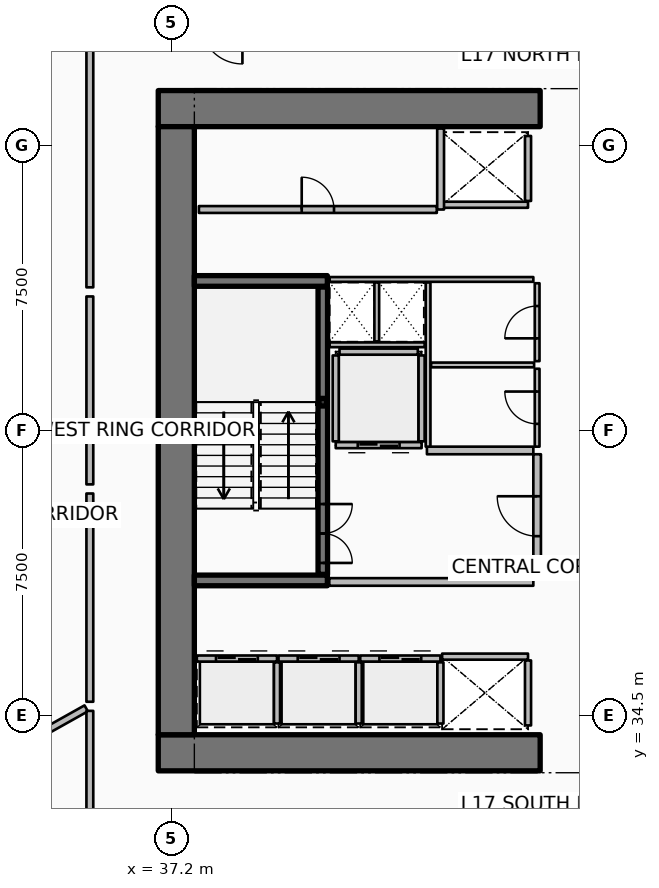
"""IFC4 building model, lengths in metres.
Left out: names, types, materials, properties, quantities, classifications, styles, units other than length and angle.
Written with IfcOpenShell. Run it as: python <this file> out.ifc"""

import sys

from ifc_helpers import new_model, si_unit, direction, frame, frame_2d, origin, origin_2d, place, context, subcontext, project, spatial, rectangle, hollow_rectangle, extrude, element, fill, save


model = new_model("IFC4")
c1 = context("Model", 3, precision=1e-05, world=origin(), true_north=direction((0.0, 1.0)))
c2 = subcontext(c1, "Body", "Model", "MODEL_VIEW")
j1 = project(units=[si_unit("LENGTHUNIT", "METRE"), si_unit("PLANEANGLEUNIT", "RADIAN")], contexts=[c1])
p1 = place(None, origin())
s1 = spatial("IfcSite", under=j1, at=p1, CompositionType="ELEMENT")
p2 = place(p1, origin())
s2 = spatial("IfcBuilding", under=s1, at=p2, CompositionType="ELEMENT")
p3 = place(p2, frame((0.0, 0.0, 71.4)))
s3 = spatial("IfcBuildingStorey", under=s2, at=p3, CompositionType="ELEMENT", Elevation=71.4)
for number, where, z_axis, x_axis in (
    (1, (36.85, 33.525, 0.0), (0.0, 0.0, 1.0), (1.0, 0.0, 0.0)),
    (2, (36.85, 50.475, 0.0), (0.0, 0.0, 1.0), (1.0, 0.0, 0.0)),
):
    element("IfcWall", number, at=place(p3, frame(where, z_axis=z_axis, x_axis=x_axis)), inside=s3, PredefinedType="SHEAR", context=c2, shape_type="SweptSolid", body=[
        extrude(rectangle(XDim=10.05, YDim=0.95, at=frame_2d((5.025, 0.0))), origin(), (0.0, 0.0, 1.0), 3.75),
    ])
p4 = place(p3, frame((37.325, 34.0, 0.0), z_axis=(0.0, 0.0, 1.0), x_axis=(0.0, 1.0, 0.0)))
e3 = element("IfcWall", 3, at=p4, inside=s3, PredefinedType="SHEAR", context=c2, shape_type="SweptSolid", body=[
    extrude(rectangle(XDim=16.0, YDim=0.95, at=frame_2d((8.0, 0.0))), origin(), (0.0, 0.0, 1.0), 3.75),
])
for number, where, z_axis, x_axis in (
    (4, (37.8, 38.06, 0.0), (0.0, 0.0, 1.0), (1.0, 0.0, 0.0)),
    (5, (37.8, 45.94, 0.0), (0.0, 0.0, 1.0), (1.0, 0.0, 0.0)),
):
    element("IfcWall", number, at=place(p3, frame(where, z_axis=z_axis, x_axis=x_axis)), inside=s3, PredefinedType="SHEAR", context=c2, shape_type="SweptSolid", body=[
        extrude(rectangle(XDim=3.5, YDim=0.28, at=frame_2d((1.75, 0.0))), origin(), (0.0, 0.0, 1.0), 3.75),
    ])
p5 = place(p3, frame((41.18, 42.75, 0.0), z_axis=(0.0, 0.0, 1.0), x_axis=(1.0, 0.0, 0.0)))
e6 = element("IfcColumn", 6, at=p5, inside=s3, PredefinedType="COLUMN", context=c2, shape_type="SweptSolid", body=[
    extrude(hollow_rectangle(XDim=0.2, YDim=0.2, WallThickness=0.01, InnerFilletRadius=0.01, OuterFilletRadius=0.02, at=origin_2d()), origin(), (0.0, 0.0, 1.0), 1.67),
])
p6 = place(p3, frame((41.18, 38.22, 0.0), z_axis=(0.0, 0.0, 1.0), x_axis=(0.0, 1.0, 0.0)))
e7 = element("IfcWall", 7, at=p6, inside=s3, PredefinedType="SOLIDWALL", context=c2, shape_type="SweptSolid", body=[
    extrude(rectangle(XDim=7.56, YDim=0.25, at=frame_2d((3.78, 0.0))), origin(), (0.0, 0.0, 1.0), 3.35),
])
p7 = place(p6, frame((0.3, 0.0, 0.0)))
e8 = element("IfcOpeningElement", 8, at=p7, cuts=e7, PredefinedType="OPENING", context=c2, shape_type="SweptSolid", body=[
    extrude(rectangle(XDim=1.55, YDim=2.15, at=frame_2d((0.775, 1.075))), frame((0.0, 0.135, 0.0), z_axis=(0.0, -1.0, 0.0), x_axis=(1.0, 0.0, 0.0)), (0.0, 0.0, 1.0), 0.27),
])
p8 = place(p3, frame((37.865, 36.005, 0.0), z_axis=(0.0, 0.0, 1.0), x_axis=(1.0, 0.0, 0.0)))
e9 = element("IfcWall", 9, at=p8, inside=s3, PredefinedType="PARTITIONING", context=c2, shape_type="SweptSolid", body=[
    extrude(rectangle(XDim=2.11, YDim=0.16, at=frame_2d((1.055, 0.0))), origin(), (0.0, 0.0, 1.0), 3.35),
])
p9 = place(p8, frame((0.505, 0.0, 0.0)))
e10 = element("IfcOpeningElement", 10, at=p9, cuts=e9, PredefinedType="OPENING", context=c2, shape_type="SweptSolid", body=[
    extrude(rectangle(XDim=1.1, YDim=2.1, at=frame_2d((0.55, 1.05))), frame((0.0, 0.09, 0.0), z_axis=(0.0, -1.0, 0.0), x_axis=(1.0, 0.0, 0.0)), (0.0, 0.0, 1.0), 0.18),
])
p10 = place(p3, frame((39.975, 34.295, 0.0), z_axis=(0.0, 0.0, 1.0), x_axis=(0.0, 1.0, 0.0)))
e11 = element("IfcWall", 11, at=p10, inside=s3, PredefinedType="PARTITIONING", context=c2, shape_type="SweptSolid", body=[
    extrude(rectangle(XDim=1.61, YDim=0.16, at=frame_2d((0.805, 0.0))), origin(), (0.0, 0.0, 1.0), 3.35),
])
p11 = place(p3, frame((40.015, 36.005, 0.0), z_axis=(0.0, 0.0, 1.0), x_axis=(1.0, 0.0, 0.0)))
e12 = element("IfcWall", 12, at=p11, inside=s3, PredefinedType="PARTITIONING", context=c2, shape_type="SweptSolid", body=[
    extrude(rectangle(XDim=2.11, YDim=0.16, at=frame_2d((1.055, 0.0))), origin(), (0.0, 0.0, 1.0), 3.35),
])
p12 = place(p11, frame((0.505, 0.0, 0.0)))
e13 = element("IfcOpeningElement", 13, at=p12, cuts=e12, PredefinedType="OPENING", context=c2, shape_type="SweptSolid", body=[
    extrude(rectangle(XDim=1.1, YDim=2.1, at=frame_2d((0.55, 1.05))), frame((0.0, 0.09, 0.0), z_axis=(0.0, -1.0, 0.0), x_axis=(1.0, 0.0, 0.0)), (0.0, 0.0, 1.0), 0.18),
])
p13 = place(p3, frame((42.125, 34.295, 0.0), z_axis=(0.0, 0.0, 1.0), x_axis=(0.0, 1.0, 0.0)))
e14 = element("IfcWall", 14, at=p13, inside=s3, PredefinedType="PARTITIONING", context=c2, shape_type="SweptSolid", body=[
    extrude(rectangle(XDim=1.61, YDim=0.16, at=frame_2d((0.805, 0.0))), origin(), (0.0, 0.0, 1.0), 3.35),
])
p14 = place(p3, frame((42.165, 36.005, 0.0), z_axis=(0.0, 0.0, 1.0), x_axis=(1.0, 0.0, 0.0)))
e15 = element("IfcWall", 15, at=p14, inside=s3, PredefinedType="PARTITIONING", context=c2, shape_type="SweptSolid", body=[
    extrude(rectangle(XDim=2.11, YDim=0.16, at=frame_2d((1.055, 0.0))), origin(), (0.0, 0.0, 1.0), 3.35),
])
p15 = place(p14, frame((0.505, 0.0, 0.0)))
e16 = element("IfcOpeningElement", 16, at=p15, cuts=e15, PredefinedType="OPENING", context=c2, shape_type="SweptSolid", body=[
    extrude(rectangle(XDim=1.1, YDim=2.1, at=frame_2d((0.55, 1.05))), frame((0.0, 0.09, 0.0), z_axis=(0.0, -1.0, 0.0), x_axis=(1.0, 0.0, 0.0)), (0.0, 0.0, 1.0), 0.18),
])
p16 = place(p3, frame((44.275, 34.295, 0.0), z_axis=(0.0, 0.0, 1.0), x_axis=(0.0, 1.0, 0.0)))
e17 = element("IfcWall", 17, at=p16, inside=s3, PredefinedType="PARTITIONING", context=c2, shape_type="SweptSolid", body=[
    extrude(rectangle(XDim=1.61, YDim=0.16, at=frame_2d((0.805, 0.0))), origin(), (0.0, 0.0, 1.0), 3.35),
])
p17 = place(p3, frame((46.58, 47.945, 0.0), z_axis=(0.0, 0.0, 1.0), x_axis=(-1.0, 0.0, 0.0)))
e18 = element("IfcWall", 18, at=p17, inside=s3, PredefinedType="PARTITIONING", context=c2, shape_type="SweptSolid", body=[
    extrude(rectangle(XDim=2.26, YDim=0.16, at=frame_2d((1.13, 0.0))), origin(), (0.0, 0.0, 1.0), 3.35),
])
p18 = place(p3, frame((46.58, 48.045, 0.0), z_axis=(0.0, 0.0, 1.0), x_axis=(0.0, 1.0, 0.0)))
e19 = element("IfcWall", 19, at=p18, inside=s3, PredefinedType="PARTITIONING", context=c2, shape_type="SweptSolid", body=[
    extrude(rectangle(XDim=1.71, YDim=0.16, at=frame_2d((0.855, 0.0))), origin(), (0.0, 0.0, 1.0), 3.35),
])
p19 = place(p3, frame((44.32, 36.055, 0.0), z_axis=(0.0, 0.0, 1.0), x_axis=(1.0, 0.0, 0.0)))
e20 = element("IfcWall", 20, at=p19, inside=s3, PredefinedType="PARTITIONING", context=c2, shape_type="SweptSolid", body=[
    extrude(rectangle(XDim=2.26, YDim=0.16, at=frame_2d((1.13, 0.0))), origin(), (0.0, 0.0, 1.0), 3.35),
])
p20 = place(p3, frame((46.58, 34.245, 0.0), z_axis=(0.0, 0.0, 1.0), x_axis=(0.0, 1.0, 0.0)))
e21 = element("IfcWall", 21, at=p20, inside=s3, PredefinedType="PARTITIONING", context=c2, shape_type="SweptSolid", body=[
    extrude(rectangle(XDim=1.71, YDim=0.16, at=frame_2d((0.855, 0.0))), origin(), (0.0, 0.0, 1.0), 3.35),
])
p21 = place(p3, frame((43.78, 41.62, 0.0), z_axis=(0.0, 0.0, 1.0), x_axis=(-1.0, 0.0, 0.0)))
e22 = element("IfcWall", 22, at=p21, inside=s3, PredefinedType="PARTITIONING", context=c2, shape_type="SweptSolid", body=[
    extrude(rectangle(XDim=2.26, YDim=0.16, at=frame_2d((1.13, 0.0))), origin(), (0.0, 0.0, 1.0), 3.35),
])
p22 = place(p21, frame((0.58, 0.0, 0.0)))
e23 = element("IfcOpeningElement", 23, at=p22, cuts=e22, PredefinedType="OPENING", context=c2, shape_type="SweptSolid", body=[
    extrude(rectangle(XDim=1.1, YDim=2.1, at=frame_2d((0.55, 1.05))), frame((0.0, 0.09, 0.0), z_axis=(0.0, -1.0, 0.0), x_axis=(1.0, 0.0, 0.0)), (0.0, 0.0, 1.0), 0.18),
])
for number, where, z_axis, x_axis in (
    (24, (43.78, 41.72, 0.0), (0.0, 0.0, 1.0), (0.0, 1.0, 0.0)),
    (25, (41.52, 41.72, 0.0), (0.0, 0.0, 1.0), (0.0, 1.0, 0.0)),
):
    element("IfcWall", number, at=place(p3, frame(where, z_axis=z_axis, x_axis=x_axis)), inside=s3, PredefinedType="PARTITIONING", context=c2, shape_type="SweptSolid", body=[
        extrude(rectangle(XDim=2.26, YDim=0.16, at=frame_2d((1.13, 0.0))), origin(), (0.0, 0.0, 1.0), 3.35),
    ])
p23 = place(p3, frame((41.62, 44.08, 0.0), z_axis=(0.0, 0.0, 1.0), x_axis=(1.0, 0.0, 0.0)))
e26 = element("IfcWall", 26, at=p23, inside=s3, PredefinedType="PARTITIONING", context=c2, shape_type="SweptSolid", body=[
    extrude(rectangle(XDim=2.06, YDim=0.16, at=frame_2d((1.03, 0.0))), origin(), (0.0, 0.0, 1.0), 3.35),
])
p24 = place(p3, frame((37.92, 47.82, 0.0), z_axis=(0.0, 0.0, 1.0), x_axis=(1.0, 0.0, 0.0)))
e27 = element("IfcWall", 27, at=p24, inside=s3, PredefinedType="PARTITIONING", context=c2, shape_type="SweptSolid", body=[
    extrude(rectangle(XDim=6.26, YDim=0.18, at=frame_2d((3.13, 0.0))), origin(), (0.0, 0.0, 1.0), 3.35),
])
p25 = place(p24, frame((2.705, 0.0, 0.0)))
e28 = element("IfcOpeningElement", 28, at=p25, cuts=e27, PredefinedType="OPENING", context=c2, shape_type="SweptSolid", body=[
    extrude(rectangle(XDim=0.85, YDim=2.06, at=frame_2d((0.425, 1.03))), frame((0.0, 0.1, 0.0), z_axis=(0.0, -1.0, 0.0), x_axis=(1.0, 0.0, 0.0)), (0.0, 0.0, 1.0), 0.2),
])
p26 = place(p3, frame((44.28, 47.82, 0.0), z_axis=(0.0, 0.0, 1.0), x_axis=(0.0, 1.0, 0.0)))
e29 = element("IfcWall", 29, at=p26, inside=s3, PredefinedType="PARTITIONING", context=c2, shape_type="SweptSolid", body=[
    extrude(rectangle(XDim=2.13, YDim=0.18, at=frame_2d((1.065, 0.0))), origin(), (0.0, 0.0, 1.0), 3.35),
])
p27 = place(p3, frame((41.35, 38.02, 0.0), z_axis=(0.0, 0.0, 1.0), x_axis=(1.0, 0.0, 0.0)))
e30 = element("IfcWall", 30, at=p27, inside=s3, PredefinedType="PARTITIONING", context=c2, shape_type="SweptSolid", body=[
    extrude(rectangle(XDim=5.37, YDim=0.2, at=frame_2d((2.685, 0.0))), origin(), (0.0, 0.0, 1.0), 3.35),
])
p28 = place(p3, frame((43.92, 41.48, 0.0), z_axis=(0.0, 0.0, 1.0), x_axis=(1.0, 0.0, 0.0)))
e31 = element("IfcWall", 31, at=p28, inside=s3, PredefinedType="PARTITIONING", context=c2, shape_type="SweptSolid", body=[
    extrude(rectangle(XDim=2.8, YDim=0.2, at=frame_2d((1.4, 0.0))), origin(), (0.0, 0.0, 1.0), 3.35),
])
p29 = place(p3, frame((46.82, 38.12, 0.0), z_axis=(0.0, 0.0, 1.0), x_axis=(0.0, 1.0, 0.0)))
e32 = element("IfcWall", 32, at=p29, inside=s3, PredefinedType="PARTITIONING", context=c2, shape_type="SweptSolid", body=[
    extrude(rectangle(XDim=3.26, YDim=0.2, at=frame_2d((1.63, 0.0))), origin(), (0.0, 0.0, 1.0), 3.35),
])
p30 = place(p29, frame((1.105, 0.0, 0.0)))
e33 = element("IfcOpeningElement", 33, at=p30, cuts=e32, PredefinedType="OPENING", context=c2, shape_type="SweptSolid", body=[
    extrude(rectangle(XDim=1.05, YDim=2.1, at=frame_2d((0.525, 1.05))), frame((0.0, 0.11, 0.0), z_axis=(0.0, -1.0, 0.0), x_axis=(1.0, 0.0, 0.0)), (0.0, 0.0, 1.0), 0.22),
])
p31 = place(p3, frame((41.36, 45.98, 0.0), z_axis=(0.0, 0.0, 1.0), x_axis=(1.0, 0.0, 0.0)))
e34 = element("IfcWall", 34, at=p31, inside=s3, PredefinedType="PARTITIONING", context=c2, shape_type="SweptSolid", body=[
    extrude(rectangle(XDim=5.36, YDim=0.125, at=frame_2d((2.68, 0.0))), origin(), (0.0, 0.0, 1.0), 2.79),
])
p32 = place(p3, frame((41.36, 44.26, 0.0), z_axis=(0.0, 0.0, 1.0), x_axis=(1.0, 0.0, 0.0)))
e35 = element("IfcWall", 35, at=p32, inside=s3, PredefinedType="PARTITIONING", context=c2, shape_type="SweptSolid", body=[
    extrude(rectangle(XDim=2.5, YDim=0.125, at=frame_2d((1.25, 0.0))), origin(), (0.0, 0.0, 1.0), 2.79),
])
p33 = place(p3, frame((42.6, 44.35, 0.0), z_axis=(0.0, 0.0, 1.0), x_axis=(0.0, 1.0, 0.0)))
e36 = element("IfcWall", 36, at=p33, inside=s3, PredefinedType="PARTITIONING", context=c2, shape_type="SweptSolid", body=[
    extrude(rectangle(XDim=1.55, YDim=0.125, at=frame_2d((0.775, 0.0))), origin(), (0.0, 0.0, 1.0), 2.79),
])
p34 = place(p3, frame((43.95, 41.58, 0.0), z_axis=(0.0, 0.0, 1.0), x_axis=(0.0, 1.0, 0.0)))
e37 = element("IfcWall", 37, at=p34, inside=s3, PredefinedType="PARTITIONING", context=c2, shape_type="SweptSolid", body=[
    extrude(rectangle(XDim=4.32, YDim=0.125, at=frame_2d((2.16, 0.0))), origin(), (0.0, 0.0, 1.0), 2.79),
])
p35 = place(p3, frame((44.03, 43.73, 0.0), z_axis=(0.0, 0.0, 1.0), x_axis=(1.0, 0.0, 0.0)))
e38 = element("IfcWall", 38, at=p35, inside=s3, PredefinedType="PARTITIONING", context=c2, shape_type="SweptSolid", body=[
    extrude(rectangle(XDim=2.71, YDim=0.125, at=frame_2d((1.355, 0.0))), origin(), (0.0, 0.0, 1.0), 2.79),
])
p36 = place(p3, frame((46.82, 41.58, 0.0), z_axis=(0.0, 0.0, 1.0), x_axis=(0.0, 1.0, 0.0)))
e39 = element("IfcWall", 39, at=p36, inside=s3, PredefinedType="PARTITIONING", context=c2, shape_type="SweptSolid", body=[
    extrude(rectangle(XDim=2.05, YDim=0.125, at=frame_2d((1.025, 0.0))), origin(), (0.0, 0.0, 1.0), 2.79),
])
p37 = place(p36, frame((0.6, 0.0, 0.0)))
e40 = element("IfcOpeningElement", 40, at=p37, cuts=e39, PredefinedType="OPENING", context=c2, shape_type="SweptSolid", body=[
    extrude(rectangle(XDim=0.85, YDim=2.06, at=frame_2d((0.425, 1.03))), frame((0.0, 0.073, 0.0), z_axis=(0.0, -1.0, 0.0), x_axis=(1.0, 0.0, 0.0)), (0.0, 0.0, 1.0), 0.145),
])
p38 = place(p3, frame((46.82, 43.83, 0.0), z_axis=(0.0, 0.0, 1.0), x_axis=(0.0, 1.0, 0.0)))
e41 = element("IfcWall", 41, at=p38, inside=s3, PredefinedType="PARTITIONING", context=c2, shape_type="SweptSolid", body=[
    extrude(rectangle(XDim=2.05, YDim=0.125, at=frame_2d((1.025, 0.0))), origin(), (0.0, 0.0, 1.0), 2.79),
])
p39 = place(p38, frame((0.6, 0.0, 0.0)))
e42 = element("IfcOpeningElement", 42, at=p39, cuts=e41, PredefinedType="OPENING", context=c2, shape_type="SweptSolid", body=[
    extrude(rectangle(XDim=0.85, YDim=2.06, at=frame_2d((0.425, 1.03))), frame((0.0, 0.073, 0.0), z_axis=(0.0, -1.0, 0.0), x_axis=(1.0, 0.0, 0.0)), (0.0, 0.0, 1.0), 0.145),
])
p40 = place(p3, frame((34.954, 34.694, 0.0), z_axis=(0.0, 0.0, 1.0), x_axis=(-0.872493465611, -0.488625779577, 0.0)))
e43 = element("IfcWall", 43, at=p40, inside=s3, PredefinedType="PARTITIONING", context=c2, shape_type="SweptSolid", body=[
    extrude(rectangle(XDim=16.586, YDim=0.18, at=frame_2d((8.293, 0.0))), origin(), (0.0, 0.0, 1.0), 2.307),
])
p41 = place(p3, frame((35.05, 52.089, 0.0), z_axis=(0.0, 0.0, 1.0), x_axis=(0.0, -1.0, 0.0)))
e44 = element("IfcWall", 44, at=p41, inside=s3, PredefinedType="PARTITIONING", context=c2, shape_type="SweptSolid", body=[
    extrude(rectangle(XDim=6.317, YDim=0.18, at=frame_2d((3.158, 0.0))), origin(), (0.0, 0.0, 1.0), 2.307),
])
p42 = place(p3, frame((35.05, 45.532, 0.0), z_axis=(0.0, 0.0, 1.0), x_axis=(0.0, -1.0, 0.0)))
e45 = element("IfcWall", 45, at=p42, inside=s3, PredefinedType="PARTITIONING", context=c2, shape_type="SweptSolid", body=[
    extrude(rectangle(XDim=4.945, YDim=0.18, at=frame_2d((2.472, 0.0))), origin(), (0.0, 0.0, 1.0), 2.307),
])
p43 = place(p3, frame((35.05, 40.347, 0.0), z_axis=(0.0, 0.0, 1.0), x_axis=(0.0, -1.0, 0.0)))
e46 = element("IfcWall", 46, at=p43, inside=s3, PredefinedType="PARTITIONING", context=c2, shape_type="SweptSolid", body=[
    extrude(rectangle(XDim=5.48, YDim=0.18, at=frame_2d((2.74, 0.0))), origin(), (0.0, 0.0, 1.0), 2.307),
])
p44 = place(p3, frame((35.05, 34.628, 0.0), z_axis=(0.0, 0.0, 1.0), x_axis=(0.0, -1.0, 0.0)))
e47 = element("IfcWall", 47, at=p44, inside=s3, PredefinedType="PARTITIONING", context=c2, shape_type="SweptSolid", body=[
    extrude(rectangle(XDim=3.258, YDim=0.18, at=frame_2d((1.629, 0.0))), origin(), (0.0, 0.0, 1.0), 2.307),
])
p45 = place(p7, origin())
e48 = element("IfcDoor", 48, at=p45, inside=s3, OperationType="DOUBLE_DOOR_SINGLE_SWING", PredefinedType="DOOR", context=c2, shape_type="SweptSolid", body=[
    extrude(rectangle(XDim=1.55, YDim=2.15, at=frame_2d((0.775, 1.075))), frame((0.0, 0.025, 0.0), z_axis=(0.0, -1.0, 0.0), x_axis=(1.0, 0.0, 0.0)), (0.0, 0.0, 1.0), 0.05),
])
fill(e8, e48)
p46 = place(p9, origin())
e49 = element("IfcDoor", 49, at=p46, inside=s3, OperationType="DOUBLE_DOOR_SLIDING", PredefinedType="DOOR", context=c2, shape_type="SweptSolid", body=[
    extrude(rectangle(XDim=1.1, YDim=2.1, at=frame_2d((0.55, 1.05))), frame((0.0, 0.025, 0.0), z_axis=(0.0, -1.0, 0.0), x_axis=(1.0, 0.0, 0.0)), (0.0, 0.0, 1.0), 0.05),
])
fill(e10, e49)
p47 = place(p12, origin())
e50 = element("IfcDoor", 50, at=p47, inside=s3, OperationType="DOUBLE_DOOR_SLIDING", PredefinedType="DOOR", context=c2, shape_type="SweptSolid", body=[
    extrude(rectangle(XDim=1.1, YDim=2.1, at=frame_2d((0.55, 1.05))), frame((0.0, 0.025, 0.0), z_axis=(0.0, -1.0, 0.0), x_axis=(1.0, 0.0, 0.0)), (0.0, 0.0, 1.0), 0.05),
])
fill(e13, e50)
p48 = place(p15, origin())
e51 = element("IfcDoor", 51, at=p48, inside=s3, OperationType="DOUBLE_DOOR_SLIDING", PredefinedType="DOOR", context=c2, shape_type="SweptSolid", body=[
    extrude(rectangle(XDim=1.1, YDim=2.1, at=frame_2d((0.55, 1.05))), frame((0.0, 0.025, 0.0), z_axis=(0.0, -1.0, 0.0), x_axis=(1.0, 0.0, 0.0)), (0.0, 0.0, 1.0), 0.05),
])
fill(e16, e51)
p49 = place(p22, origin())
e52 = element("IfcDoor", 52, at=p49, inside=s3, OperationType="DOUBLE_DOOR_SLIDING", PredefinedType="DOOR", context=c2, shape_type="SweptSolid", body=[
    extrude(rectangle(XDim=1.1, YDim=2.1, at=frame_2d((0.55, 1.05))), frame((0.0, 0.025, 0.0), z_axis=(0.0, -1.0, 0.0), x_axis=(1.0, 0.0, 0.0)), (0.0, 0.0, 1.0), 0.05),
])
fill(e23, e52)
p50 = place(p25, origin())
e53 = element("IfcDoor", 53, at=p50, inside=s3, OperationType="SINGLE_SWING_LEFT", PredefinedType="DOOR", context=c2, shape_type="SweptSolid", body=[
    extrude(rectangle(XDim=0.85, YDim=2.06, at=frame_2d((0.425, 1.03))), frame((0.0, 0.025, 0.0), z_axis=(0.0, -1.0, 0.0), x_axis=(1.0, 0.0, 0.0)), (0.0, 0.0, 1.0), 0.05),
])
fill(e28, e53)
p51 = place(p30, origin())
e54 = element("IfcDoor", 54, at=p51, inside=s3, OperationType="SINGLE_SWING_RIGHT", PredefinedType="DOOR", context=c2, shape_type="SweptSolid", body=[
    extrude(rectangle(XDim=1.05, YDim=2.1, at=frame_2d((0.525, 1.05))), frame((0.0, 0.025, 0.0), z_axis=(0.0, -1.0, 0.0), x_axis=(1.0, 0.0, 0.0)), (0.0, 0.0, 1.0), 0.05),
])
fill(e33, e54)
p52 = place(p37, origin())
e55 = element("IfcDoor", 55, at=p52, inside=s3, OperationType="SINGLE_SWING_RIGHT", PredefinedType="DOOR", context=c2, shape_type="SweptSolid", body=[
    extrude(rectangle(XDim=0.85, YDim=2.06, at=frame_2d((0.425, 1.03))), frame((0.0, 0.025, 0.0), z_axis=(0.0, -1.0, 0.0), x_axis=(1.0, 0.0, 0.0)), (0.0, 0.0, 1.0), 0.05),
])
fill(e40, e55)
p53 = place(p39, origin())
e56 = element("IfcDoor", 56, at=p53, inside=s3, OperationType="SINGLE_SWING_LEFT", PredefinedType="DOOR", context=c2, shape_type="SweptSolid", body=[
    extrude(rectangle(XDim=0.85, YDim=2.06, at=frame_2d((0.425, 1.03))), frame((0.0, 0.025, 0.0), z_axis=(0.0, -1.0, 0.0), x_axis=(1.0, 0.0, 0.0)), (0.0, 0.0, 1.0), 0.05),
])
fill(e42, e56)
save(model, sys.argv[1])
